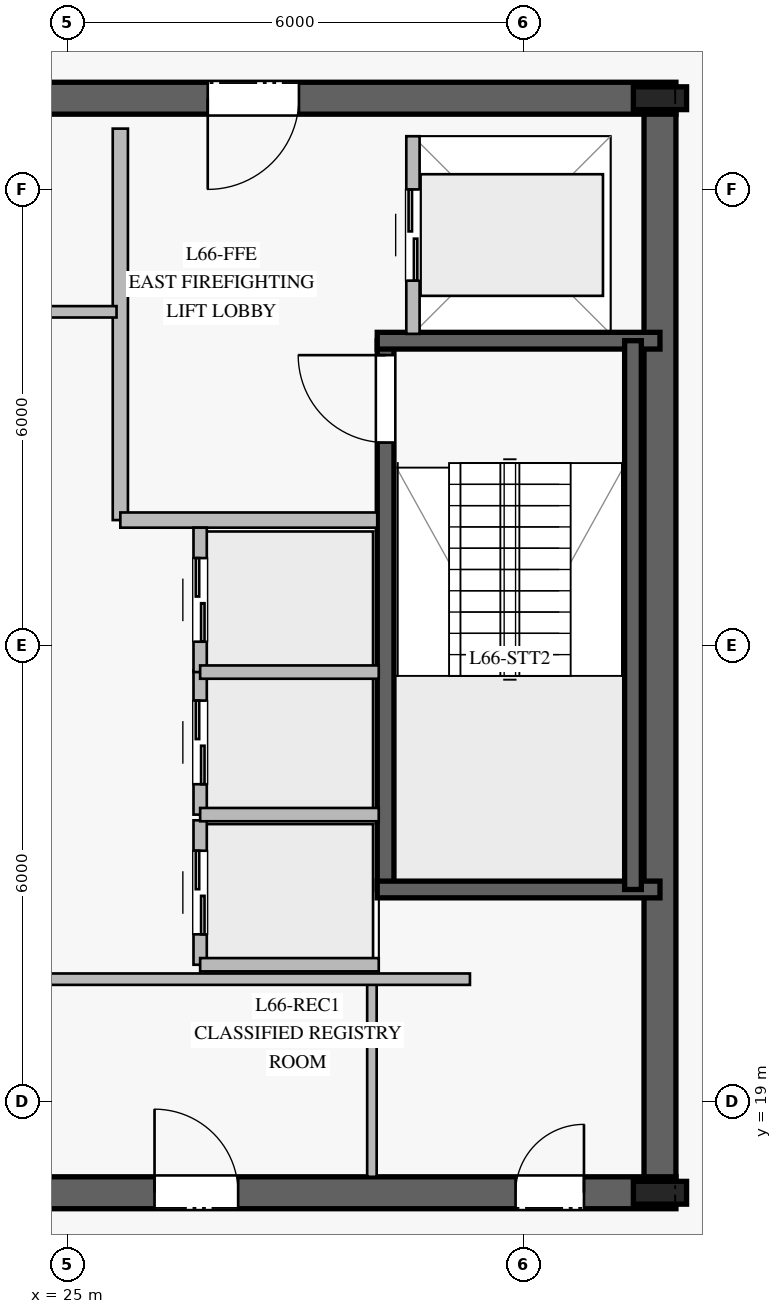
"""IFC4 building model, lengths in metres.
Left out: names, types, materials, properties, quantities, classifications, styles, units other than length and angle.
Written with IfcOpenShell. Run it as: python <this file> out.ifc"""

import sys

from ifc_helpers import new_model, si_unit, direction, frame, frame_2d, origin, origin_2d, place, context, subcontext, project, spatial, rectangle, i_section, extrude, element, fill, save


model = new_model("IFC4")
c1 = context("Model", 3, precision=1e-05, world=origin(), true_north=direction((0.0, 1.0)))
c2 = subcontext(c1, "Body", "Model", "MODEL_VIEW")
j1 = project(units=[si_unit("LENGTHUNIT", "METRE"), si_unit("PLANEANGLEUNIT", "RADIAN")], contexts=[c1])
p1 = place(None, origin())
s1 = spatial("IfcSite", under=j1, at=p1, CompositionType="ELEMENT")
p2 = place(p1, origin())
s2 = spatial("IfcBuilding", under=s1, at=p2, CompositionType="ELEMENT")
p3 = place(p2, frame((0.0, 0.0, 274.2)))
s3 = spatial("IfcBuildingStorey", under=s2, at=p3, CompositionType="ELEMENT", Elevation=274.2)
p4 = place(p3, frame((16.99, 17.8, 0.0), z_axis=(0.0, 0.0, 1.0), x_axis=(1.0, 0.0, 0.0)))
e1 = element("IfcWall", 1, at=p4, inside=s3, PredefinedType="SHEAR", context=c2, shape_type="SweptSolid", body=[
    extrude(rectangle(XDim=16.02, YDim=0.42, at=frame_2d((8.01, 0.0))), origin(), (0.0, 0.0, 1.0), 3.78),
])
p5 = place(p4, frame((4.96, 0.0, 0.0)))
e2 = element("IfcOpeningElement", 2, at=p5, cuts=e1, PredefinedType="OPENING", context=c2, shape_type="SweptSolid", body=[
    extrude(rectangle(XDim=1.2, YDim=2.25, at=frame_2d((0.6, 1.125))), frame((0.0, 0.22, 0.0), z_axis=(0.0, -1.0, 0.0), x_axis=(1.0, 0.0, 0.0)), (0.0, 0.0, 1.0), 0.44),
])
p6 = place(p4, frame((13.91, 0.0, 0.0)))
e3 = element("IfcOpeningElement", 3, at=p6, cuts=e1, PredefinedType="OPENING", context=c2, shape_type="SweptSolid", body=[
    extrude(rectangle(XDim=0.9, YDim=2.1, at=frame_2d((0.45, 1.05))), frame((0.0, 0.22, 0.0), z_axis=(0.0, -1.0, 0.0), x_axis=(1.0, 0.0, 0.0)), (0.0, 0.0, 1.0), 0.44),
])
p7 = place(p4, frame((9.16, 0.0, 0.0)))
e4 = element("IfcOpeningElement", 4, at=p7, cuts=e1, PredefinedType="OPENING", context=c2, shape_type="SweptSolid", body=[
    extrude(rectangle(XDim=1.1, YDim=2.2, at=frame_2d((0.55, 1.1))), frame((0.0, 0.22, 0.0), z_axis=(0.0, -1.0, 0.0), x_axis=(1.0, 0.0, 0.0)), (0.0, 0.0, 1.0), 0.44),
])
p8 = place(p3, frame((33.01, 32.2, 0.0), z_axis=(0.0, 0.0, 1.0), x_axis=(-1.0, 0.0, 0.0)))
e5 = element("IfcWall", 5, at=p8, inside=s3, PredefinedType="SHEAR", context=c2, shape_type="SweptSolid", body=[
    extrude(rectangle(XDim=16.02, YDim=0.42, at=frame_2d((8.01, 0.0))), origin(), (0.0, 0.0, 1.0), 3.78),
])
p9 = place(p8, frame((4.96, 0.0, 0.0)))
e6 = element("IfcOpeningElement", 6, at=p9, cuts=e5, PredefinedType="OPENING", context=c2, shape_type="SweptSolid", body=[
    extrude(rectangle(XDim=1.2, YDim=2.25, at=frame_2d((0.6, 1.125))), frame((0.0, 0.22, 0.0), z_axis=(0.0, -1.0, 0.0), x_axis=(1.0, 0.0, 0.0)), (0.0, 0.0, 1.0), 0.44),
])
p10 = place(p8, frame((9.785, 0.0, 0.0)))
e7 = element("IfcOpeningElement", 7, at=p10, cuts=e5, PredefinedType="OPENING", context=c2, shape_type="SweptSolid", body=[
    extrude(rectangle(XDim=1.1, YDim=2.2, at=frame_2d((0.55, 1.1))), frame((0.0, 0.22, 0.0), z_axis=(0.0, -1.0, 0.0), x_axis=(1.0, 0.0, 0.0)), (0.0, 0.0, 1.0), 0.44),
])
p11 = place(p3, frame((32.8, 18.01, 0.0), z_axis=(0.0, 0.0, 1.0), x_axis=(0.0, 1.0, 0.0)))
e8 = element("IfcWall", 8, at=p11, inside=s3, PredefinedType="SHEAR", context=c2, shape_type="SweptSolid", body=[
    extrude(rectangle(XDim=13.98, YDim=0.42, at=frame_2d((6.99, 0.0))), origin(), (0.0, 0.0, 1.0), 3.78),
])
for number, where, z_axis, x_axis in (
    (9, (32.8, 17.8, 0.0), (0.0, 0.0, 1.0), (1.0, 0.0, 0.0)),
    (10, (32.8, 32.2, 0.0), (0.0, 0.0, 1.0), (1.0, 0.0, 0.0)),
):
    element("IfcColumn", number, at=place(p3, frame(where, z_axis=z_axis, x_axis=x_axis)), inside=s3, PredefinedType="COLUMN", context=c2, shape_type="SweptSolid", body=[
        extrude(i_section(OverallWidth=0.3, OverallDepth=0.7, WebThickness=0.017, FlangeThickness=0.032, at=origin_2d()), origin(), (0.0, 0.0, 1.0), 4.0),
    ])
p12 = place(p3, frame((29.19, 21.79, 0.0), z_axis=(0.0, 0.0, 1.0), x_axis=(0.0, 1.0, 0.0)))
e11 = element("IfcWall", 11, at=p12, inside=s3, PredefinedType="SOLIDWALL", context=c2, shape_type="SweptSolid", body=[
    extrude(rectangle(XDim=7.22, YDim=0.22, at=frame_2d((3.61, 0.0))), origin(), (0.0, 0.0, 1.0), 3.78),
])
p13 = place(p12, frame((5.88, 0.0, 0.0)))
e12 = element("IfcOpeningElement", 12, at=p13, cuts=e11, PredefinedType="OPENING", context=c2, shape_type="SweptSolid", body=[
    extrude(rectangle(XDim=1.15, YDim=2.2, at=frame_2d((0.575, 1.1))), frame((0.0, 0.12, 0.0), z_axis=(0.0, -1.0, 0.0), x_axis=(1.0, 0.0, 0.0)), (0.0, 0.0, 1.0), 0.24),
])
for number, where, z_axis, x_axis in (
    (13, (29.08, 21.79, 0.0), (0.0, 0.0, 1.0), (1.0, 0.0, 0.0)),
    (14, (29.08, 29.01, 0.0), (0.0, 0.0, 1.0), (1.0, 0.0, 0.0)),
):
    element("IfcWall", number, at=place(p3, frame(where, z_axis=z_axis, x_axis=x_axis)), inside=s3, PredefinedType="SOLIDWALL", context=c2, shape_type="SweptSolid", body=[
        extrude(rectangle(XDim=3.72, YDim=0.22, at=frame_2d((1.86, 0.0))), origin(), (0.0, 0.0, 1.0), 3.78),
    ])
p14 = place(p3, frame((32.445, 29.01, 0.0), z_axis=(0.0, 0.0, 1.0), x_axis=(0.0, -1.0, 0.0)))
e15 = element("IfcWall", 15, at=p14, inside=s3, PredefinedType="SOLIDWALL", context=c2, shape_type="SweptSolid", body=[
    extrude(rectangle(XDim=7.22, YDim=0.22, at=frame_2d((3.61, 0.0))), origin(), (0.0, 0.0, 1.0), 3.78),
])
p15 = place(p3, frame((25.7, 26.65, 0.0), z_axis=(0.0, 0.0, 1.0), x_axis=(0.0, 1.0, 0.0)))
e16 = element("IfcWall", 16, at=p15, inside=s3, PredefinedType="PARTITIONING", context=c2, shape_type="SweptSolid", body=[
    extrude(rectangle(XDim=5.15, YDim=0.2, at=frame_2d((2.575, 0.0))), origin(), (0.0, 0.0, 1.0), 3.78),
])
p16 = place(p3, frame((25.7, 26.65, 0.0), z_axis=(0.0, 0.0, 1.0), x_axis=(1.0, 0.0, 0.0)))
e17 = element("IfcWall", 17, at=p16, inside=s3, PredefinedType="PARTITIONING", context=c2, shape_type="SweptSolid", body=[
    extrude(rectangle(XDim=3.38, YDim=0.2, at=frame_2d((1.69, 0.0))), origin(), (0.0, 0.0, 1.0), 3.78),
])
p17 = place(p3, frame((29.01, 18.01, 0.0), z_axis=(0.0, 0.0, 1.0), x_axis=(0.0, 1.0, 0.0)))
e18 = element("IfcWall", 18, at=p17, inside=s3, PredefinedType="PARTITIONING", context=c2, shape_type="SweptSolid", body=[
    extrude(rectangle(XDim=2.54, YDim=0.125, at=frame_2d((1.27, 0.0))), origin(), (0.0, 0.0, 1.0), 3.78),
])
p18 = place(p3, frame((24.4, 20.61, 0.0), z_axis=(0.0, 0.0, 1.0), x_axis=(1.0, 0.0, 0.0)))
e19 = element("IfcWall", 19, at=p18, inside=s3, PredefinedType="PARTITIONING", context=c2, shape_type="SweptSolid", body=[
    extrude(rectangle(XDim=5.9, YDim=0.15, at=frame_2d((2.95, 0.0))), origin(), (0.0, 0.0, 1.0), 3.78),
])
p19 = place(p3, frame((19.75, 29.39, 0.0), z_axis=(0.0, 0.0, 1.0), x_axis=(1.0, 0.0, 0.0)))
e20 = element("IfcWall", 20, at=p19, inside=s3, PredefinedType="PARTITIONING", context=c2, shape_type="SweptSolid", body=[
    extrude(rectangle(XDim=5.9, YDim=0.15, at=frame_2d((2.95, 0.0))), origin(), (0.0, 0.0, 1.0), 3.78),
])
p20 = place(p3, frame((26.75, 20.8, 0.0), z_axis=(0.0, 0.0, 1.0), x_axis=(0.0, 1.0, 0.0)))
e21 = element("IfcWall", 21, at=p20, inside=s3, PredefinedType="PARTITIONING", context=c2, shape_type="SweptSolid", body=[
    extrude(rectangle(XDim=1.9, YDim=0.175, at=frame_2d((0.95, 0.0))), origin(), (0.0, 0.0, 1.0), 3.78),
])
p21 = place(p20, frame((0.4, 0.0, 0.0)))
e22 = element("IfcOpeningElement", 22, at=p21, cuts=e21, PredefinedType="OPENING", context=c2, shape_type="SweptSolid", body=[
    extrude(rectangle(XDim=1.1, YDim=2.2, at=frame_2d((0.55, 1.1))), frame((0.0, 0.098, 0.0), z_axis=(0.0, -1.0, 0.0), x_axis=(1.0, 0.0, 0.0)), (0.0, 0.0, 1.0), 0.195),
])
p22 = place(p3, frame((26.75, 20.8, 0.0), z_axis=(0.0, 0.0, 1.0), x_axis=(1.0, 0.0, 0.0)))
e23 = element("IfcWall", 23, at=p22, inside=s3, PredefinedType="PARTITIONING", context=c2, shape_type="SweptSolid", body=[
    extrude(rectangle(XDim=2.35, YDim=0.175, at=frame_2d((1.175, 0.0))), origin(), (0.0, 0.0, 1.0), 3.78),
])
p23 = place(p3, frame((26.75, 22.775, 0.0), z_axis=(0.0, 0.0, 1.0), x_axis=(0.0, 1.0, 0.0)))
e24 = element("IfcWall", 24, at=p23, inside=s3, PredefinedType="PARTITIONING", context=c2, shape_type="SweptSolid", body=[
    extrude(rectangle(XDim=1.9, YDim=0.175, at=frame_2d((0.95, 0.0))), origin(), (0.0, 0.0, 1.0), 3.78),
])
p24 = place(p23, frame((0.4, 0.0, 0.0)))
e25 = element("IfcOpeningElement", 25, at=p24, cuts=e24, PredefinedType="OPENING", context=c2, shape_type="SweptSolid", body=[
    extrude(rectangle(XDim=1.1, YDim=2.2, at=frame_2d((0.55, 1.1))), frame((0.0, 0.098, 0.0), z_axis=(0.0, -1.0, 0.0), x_axis=(1.0, 0.0, 0.0)), (0.0, 0.0, 1.0), 0.195),
])
p25 = place(p3, frame((26.75, 22.775, 0.0), z_axis=(0.0, 0.0, 1.0), x_axis=(1.0, 0.0, 0.0)))
e26 = element("IfcWall", 26, at=p25, inside=s3, PredefinedType="PARTITIONING", context=c2, shape_type="SweptSolid", body=[
    extrude(rectangle(XDim=2.35, YDim=0.175, at=frame_2d((1.175, 0.0))), origin(), (0.0, 0.0, 1.0), 3.78),
])
p26 = place(p3, frame((26.75, 24.65, 0.0), z_axis=(0.0, 0.0, 1.0), x_axis=(0.0, 1.0, 0.0)))
e27 = element("IfcWall", 27, at=p26, inside=s3, PredefinedType="PARTITIONING", context=c2, shape_type="SweptSolid", body=[
    extrude(rectangle(XDim=1.9, YDim=0.175, at=frame_2d((0.95, 0.0))), origin(), (0.0, 0.0, 1.0), 3.78),
])
p27 = place(p26, frame((0.4, 0.0, 0.0)))
e28 = element("IfcOpeningElement", 28, at=p27, cuts=e27, PredefinedType="OPENING", context=c2, shape_type="SweptSolid", body=[
    extrude(rectangle(XDim=1.1, YDim=2.2, at=frame_2d((0.55, 1.1))), frame((0.0, 0.098, 0.0), z_axis=(0.0, -1.0, 0.0), x_axis=(1.0, 0.0, 0.0)), (0.0, 0.0, 1.0), 0.195),
])
p28 = place(p3, frame((26.75, 24.65, 0.0), z_axis=(0.0, 0.0, 1.0), x_axis=(1.0, 0.0, 0.0)))
e29 = element("IfcWall", 29, at=p28, inside=s3, PredefinedType="PARTITIONING", context=c2, shape_type="SweptSolid", body=[
    extrude(rectangle(XDim=2.35, YDim=0.175, at=frame_2d((1.175, 0.0))), origin(), (0.0, 0.0, 1.0), 3.78),
])
p29 = place(p3, frame((29.55, 29.1, 0.0), z_axis=(0.0, 0.0, 1.0), x_axis=(0.0, 1.0, 0.0)))
e30 = element("IfcWall", 30, at=p29, inside=s3, PredefinedType="PARTITIONING", context=c2, shape_type="SweptSolid", body=[
    extrude(rectangle(XDim=2.6, YDim=0.175, at=frame_2d((1.3, 0.0))), origin(), (0.0, 0.0, 1.0), 3.78),
])
p30 = place(p29, frame((0.7, 0.0, 0.0)))
e31 = element("IfcOpeningElement", 31, at=p30, cuts=e30, PredefinedType="OPENING", context=c2, shape_type="SweptSolid", body=[
    extrude(rectangle(XDim=1.2, YDim=2.2, at=frame_2d((0.6, 1.1))), frame((0.0, 0.098, 0.0), z_axis=(0.0, -1.0, 0.0), x_axis=(1.0, 0.0, 0.0)), (0.0, 0.0, 1.0), 0.195),
])
p31 = place(p13, origin())
e32 = element("IfcDoor", 32, at=p31, inside=s3, OperationType="SINGLE_SWING_RIGHT", PredefinedType="DOOR", context=c2, shape_type="SweptSolid", body=[
    extrude(rectangle(XDim=1.15, YDim=2.2, at=frame_2d((0.575, 1.1))), frame((0.0, 0.025, 0.0), z_axis=(0.0, -1.0, 0.0), x_axis=(1.0, 0.0, 0.0)), (0.0, 0.0, 1.0), 0.05),
])
fill(e12, e32)
p32 = place(p9, origin())
e33 = element("IfcDoor", 33, at=p32, inside=s3, OperationType="SINGLE_SWING_RIGHT", PredefinedType="DOOR", context=c2, shape_type="SweptSolid", body=[
    extrude(rectangle(XDim=1.2, YDim=2.25, at=frame_2d((0.6, 1.125))), frame((0.0, 0.025, 0.0), z_axis=(0.0, -1.0, 0.0), x_axis=(1.0, 0.0, 0.0)), (0.0, 0.0, 1.0), 0.05),
])
fill(e6, e33)
p33 = place(p6, origin())
e34 = element("IfcDoor", 34, at=p33, inside=s3, OperationType="SINGLE_SWING_RIGHT", PredefinedType="DOOR", context=c2, shape_type="SweptSolid", body=[
    extrude(rectangle(XDim=0.9, YDim=2.1, at=frame_2d((0.45, 1.05))), frame((0.0, 0.025, 0.0), z_axis=(0.0, -1.0, 0.0), x_axis=(1.0, 0.0, 0.0)), (0.0, 0.0, 1.0), 0.05),
])
fill(e3, e34)
p34 = place(p7, origin())
e35 = element("IfcDoor", 35, at=p34, inside=s3, OperationType="SINGLE_SWING_LEFT", PredefinedType="DOOR", context=c2, shape_type="SweptSolid", body=[
    extrude(rectangle(XDim=1.1, YDim=2.2, at=frame_2d((0.55, 1.1))), frame((0.0, 0.025, 0.0), z_axis=(0.0, -1.0, 0.0), x_axis=(1.0, 0.0, 0.0)), (0.0, 0.0, 1.0), 0.05),
])
fill(e4, e35)
p35 = place(p21, origin())
e36 = element("IfcDoor", 36, at=p35, inside=s3, OperationType="DOUBLE_DOOR_SLIDING", PredefinedType="DOOR", context=c2, shape_type="SweptSolid", body=[
    extrude(rectangle(XDim=1.1, YDim=2.2, at=frame_2d((0.55, 1.1))), frame((0.0, 0.025, 0.0), z_axis=(0.0, -1.0, 0.0), x_axis=(1.0, 0.0, 0.0)), (0.0, 0.0, 1.0), 0.05),
])
fill(e22, e36)
p36 = place(p24, origin())
e37 = element("IfcDoor", 37, at=p36, inside=s3, OperationType="DOUBLE_DOOR_SLIDING", PredefinedType="DOOR", context=c2, shape_type="SweptSolid", body=[
    extrude(rectangle(XDim=1.1, YDim=2.2, at=frame_2d((0.55, 1.1))), frame((0.0, 0.025, 0.0), z_axis=(0.0, -1.0, 0.0), x_axis=(1.0, 0.0, 0.0)), (0.0, 0.0, 1.0), 0.05),
])
fill(e25, e37)
p37 = place(p27, origin())
e38 = element("IfcDoor", 38, at=p37, inside=s3, OperationType="DOUBLE_DOOR_SLIDING", PredefinedType="DOOR", context=c2, shape_type="SweptSolid", body=[
    extrude(rectangle(XDim=1.1, YDim=2.2, at=frame_2d((0.55, 1.1))), frame((0.0, 0.025, 0.0), z_axis=(0.0, -1.0, 0.0), x_axis=(1.0, 0.0, 0.0)), (0.0, 0.0, 1.0), 0.05),
])
fill(e28, e38)
p38 = place(p30, origin())
e39 = element("IfcDoor", 39, at=p38, inside=s3, OperationType="DOUBLE_DOOR_SLIDING", PredefinedType="DOOR", context=c2, shape_type="SweptSolid", body=[
    extrude(rectangle(XDim=1.2, YDim=2.2, at=frame_2d((0.6, 1.1))), frame((0.0, 0.025, 0.0), z_axis=(0.0, -1.0, 0.0), x_axis=(1.0, 0.0, 0.0)), (0.0, 0.0, 1.0), 0.05),
])
fill(e31, e39)
save(model, sys.argv[1])
